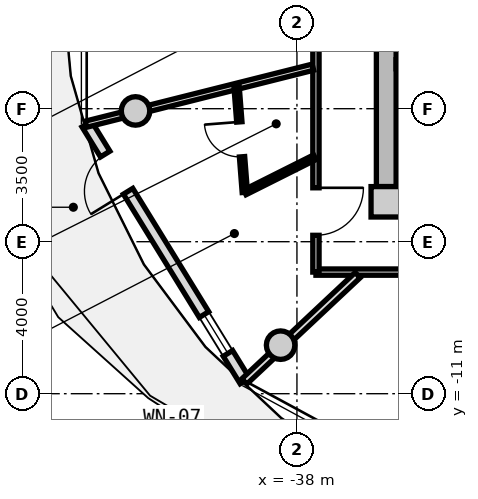
"""IFC4 building model, lengths in metres.
Left out: names, types, materials, properties, quantities, classifications, styles, units other than length and angle.
Written with IfcOpenShell. Run it as: python <this file> out.ifc"""

import sys

from ifc_helpers import new_model, si_unit, direction, frame, frame_2d, origin, origin_2d, place, context, subcontext, project, spatial, rectangle, circle, extrude, source, transform, mapped, element, fill, save


model = new_model("IFC4")
c1 = context("Model", 3, precision=1e-05, world=origin(), true_north=direction((0.0, 1.0)))
c2 = subcontext(c1, "Body", "Model", "MODEL_VIEW")
j1 = project(units=[si_unit("LENGTHUNIT", "METRE"), si_unit("PLANEANGLEUNIT", "RADIAN")], contexts=[c1])
p1 = place(None, origin())
s1 = spatial("IfcSite", under=j1, at=p1, CompositionType="ELEMENT")
p2 = place(p1, origin())
s2 = spatial("IfcBuilding", under=s1, at=p2, CompositionType="ELEMENT")
p3 = place(p2, frame((0.0, 0.0, 220.0)))
s3 = spatial("IfcBuildingStorey", under=s2, at=p3, CompositionType="ELEMENT", Elevation=220.0)
m1 = source(origin(), c2, "Body", "SweptSolid", [
    extrude(rectangle(XDim=0.8, YDim=0.8, at=origin_2d()), origin(), (0.0, 0.0, 1.0), 3.05),
])
p4 = place(p3, frame((-35.65, -5.95, 0.0), z_axis=(0.0, 0.0, 1.0), x_axis=(1.0, 0.0, 0.0)))
e1 = element("IfcColumn", 1, at=p4, inside=s3, PredefinedType="COLUMN", context=c2, shape_type="MappedRepresentation", body=[
    mapped(m1, transform((0.0, 0.0, 0.0), x_axis=(1.0, 0.0, 0.0), y_axis=(0.0, 1.0, 0.0), z_axis=(0.0, 0.0, 1.0), scale=1.0)),
])
m2 = source(origin(), c2, "Body", "SweptSolid", [
    extrude(rectangle(XDim=11.1, YDim=0.52, at=frame_2d((5.55, 0.0))), origin(), (0.0, 0.0, 1.0), 2.76),
])
p5 = place(p3, frame((-35.65, -5.55, 0.0), z_axis=(0.0, 0.0, 1.0), x_axis=(0.0, 1.0, 0.0)))
e2 = element("IfcWall", 2, at=p5, inside=s3, PredefinedType="SHEAR", context=c2, shape_type="MappedRepresentation", body=[
    mapped(m2, transform((0.0, 0.0, 0.0), x_axis=(1.0, 0.0, 0.0), y_axis=(0.0, 1.0, 0.0), z_axis=(0.0, 0.0, 1.0), scale=1.0)),
])
p6 = place(p5, frame((3.8, 0.0, 0.0)))
e3 = element("IfcOpeningElement", 3, at=p6, cuts=e2, PredefinedType="OPENING", context=c2, shape_type="SweptSolid", body=[
    extrude(rectangle(XDim=1.2, YDim=2.15, at=frame_2d((0.6, 1.075))), frame((0.0, 0.27, 0.0), z_axis=(0.0, -1.0, 0.0), x_axis=(1.0, 0.0, 0.0)), (0.0, 0.0, 1.0), 0.54),
])
m3 = source(origin(), c2, "Body", "SweptSolid", [
    extrude(circle(Radius=0.375, at=origin_2d()), origin(), (0.0, 0.0, 1.0), 3.05),
])
for number, where, z_axis, x_axis in (
    (4, (-42.247, -3.559, 0.0), (0.0, 0.0, 1.0), (1.0, 0.0, 0.0)),
    (5, (-38.43, -9.723, 0.0), (0.0, 0.0, 1.0), (1.0, 0.0, 0.0)),
):
    element("IfcColumn", number, at=place(p3, frame(where, z_axis=z_axis, x_axis=x_axis)), inside=s3, PredefinedType="COLUMN", context=c2, shape_type="MappedRepresentation", body=[
        mapped(m3, transform((0.0, 0.0, 0.0), x_axis=(1.0, 0.0, 0.0), y_axis=(0.0, 1.0, 0.0), z_axis=(0.0, 0.0, 1.0), scale=1.0)),
    ])
m4 = source(origin(), c2, "Body", "SweptSolid", [
    extrude(rectangle(XDim=7.938, YDim=0.29, at=frame_2d((3.969, 0.0))), origin(), (0.0, 0.0, 1.0), 2.76),
])
p7 = place(p3, frame((-39.37, -10.663, 0.0), z_axis=(0.0, 0.0, 1.0), x_axis=(-0.524244987663, 0.851567491694, 0.0)))
e6 = element("IfcWall", 6, at=p7, inside=s3, PredefinedType="SOLIDWALL", context=c2, shape_type="MappedRepresentation", body=[
    mapped(m4, transform((0.0, 0.0, 0.0), x_axis=(1.0, 0.0, 0.0), y_axis=(0.0, 1.0, 0.0), z_axis=(0.0, 0.0, 1.0), scale=1.0)),
])
p8 = place(p7, frame((5.86, 0.0, 0.0)))
e7 = element("IfcOpeningElement", 7, at=p8, cuts=e6, PredefinedType="OPENING", context=c2, shape_type="SweptSolid", body=[
    extrude(rectangle(XDim=1.15, YDim=2.25, at=frame_2d((0.575, 1.125))), frame((0.0, 0.155, 0.0), z_axis=(0.0, -1.0, 0.0), x_axis=(1.0, 0.0, 0.0)), (0.0, 0.0, 1.0), 0.31),
])
p9 = place(p7, frame((0.85, 0.0, 0.85)))
e8 = element("IfcOpeningElement", 8, at=p9, cuts=e6, PredefinedType="OPENING", context=c2, shape_type="SweptSolid", body=[
    extrude(rectangle(XDim=1.2, YDim=1.5, at=frame_2d((0.6, 0.75))), frame((0.0, 0.155, 0.0), z_axis=(0.0, -1.0, 0.0), x_axis=(1.0, 0.0, 0.0)), (0.0, 0.0, 1.0), 0.31),
])
m5 = source(origin(), c2, "Body", "SweptSolid", [
    extrude(rectangle(XDim=7.93, YDim=0.24, at=frame_2d((3.965, 0.0))), origin(), (0.0, 0.0, 1.0), 2.76),
])
p10 = place(p3, frame((-35.39, -2.33, 0.0), z_axis=(0.0, 0.0, 1.0), x_axis=(1.0, 0.0, 0.0)))
e9 = element("IfcWall", 9, at=p10, inside=s3, PredefinedType="PARTITIONING", context=c2, shape_type="MappedRepresentation", body=[
    mapped(m5, transform((0.0, 0.0, 0.0), x_axis=(1.0, 0.0, 0.0), y_axis=(0.0, 1.0, 0.0), z_axis=(0.0, 0.0, 1.0), scale=1.0)),
])
p11 = place(p10, frame((1.05, 0.0, 0.0)))
e10 = element("IfcOpeningElement", 10, at=p11, cuts=e9, PredefinedType="OPENING", context=c2, shape_type="SweptSolid", body=[
    extrude(rectangle(XDim=1.1, YDim=2.15, at=frame_2d((0.55, 1.075))), frame((0.0, 0.13, 0.0), z_axis=(0.0, -1.0, 0.0), x_axis=(1.0, 0.0, 0.0)), (0.0, 0.0, 1.0), 0.26),
])
m6 = source(origin(), c2, "Body", "SweptSolid", [
    extrude(rectangle(XDim=19.0, YDim=0.165, at=frame_2d((9.5, 0.0))), origin(), (0.0, 0.0, 1.0), 2.745),
])
p12 = place(p3, frame((-18.5, -7.8, 0.0), z_axis=(0.0, 0.0, 1.0), x_axis=(-1.0, 0.0, 0.0)))
e11 = element("IfcWall", 11, at=p12, inside=s3, PredefinedType="PARTITIONING", context=c2, shape_type="MappedRepresentation", body=[
    mapped(m6, transform((0.0, 0.0, 0.0), x_axis=(1.0, 0.0, 0.0), y_axis=(0.0, 1.0, 0.0), z_axis=(0.0, 0.0, 1.0), scale=1.0)),
])
p13 = place(p12, frame((14.191, 0.0, 0.0)))
e12 = element("IfcOpeningElement", 12, at=p13, cuts=e11, PredefinedType="OPENING", context=c2, shape_type="SweptSolid", body=[
    extrude(rectangle(XDim=1.25, YDim=2.2, at=frame_2d((0.625, 1.1))), frame((0.0, 0.093, 0.0), z_axis=(0.0, -1.0, 0.0), x_axis=(1.0, 0.0, 0.0)), (0.0, 0.0, 1.0), 0.185),
])
p14 = place(p12, frame((8.875, 0.0, 0.0)))
e13 = element("IfcOpeningElement", 13, at=p14, cuts=e11, PredefinedType="OPENING", context=c2, shape_type="SweptSolid", body=[
    extrude(rectangle(XDim=1.25, YDim=2.2, at=frame_2d((0.625, 1.1))), frame((0.0, 0.093, 0.0), z_axis=(0.0, -1.0, 0.0), x_axis=(1.0, 0.0, 0.0)), (0.0, 0.0, 1.0), 0.185),
])
p15 = place(p12, frame((3.559, 0.0, 0.0)))
e14 = element("IfcOpeningElement", 14, at=p15, cuts=e11, PredefinedType="OPENING", context=c2, shape_type="SweptSolid", body=[
    extrude(rectangle(XDim=1.25, YDim=2.2, at=frame_2d((0.625, 1.1))), frame((0.0, 0.093, 0.0), z_axis=(0.0, -1.0, 0.0), x_axis=(1.0, 0.0, 0.0)), (0.0, 0.0, 1.0), 0.185),
])
m7 = source(origin(), c2, "Body", "SweptSolid", [
    extrude(rectangle(XDim=6.88, YDim=0.165, at=frame_2d((3.44, 0.0))), origin(), (0.0, 0.0, 1.0), 2.745),
])
p16 = place(p3, frame((-37.5, -7.8, 0.0), z_axis=(0.0, 0.0, 1.0), x_axis=(0.0, 1.0, 0.0)))
e15 = element("IfcWall", 15, at=p16, inside=s3, PredefinedType="PARTITIONING", context=c2, shape_type="MappedRepresentation", body=[
    mapped(m7, transform((0.0, 0.0, 0.0), x_axis=(1.0, 0.0, 0.0), y_axis=(0.0, 1.0, 0.0), z_axis=(0.0, 0.0, 1.0), scale=1.0)),
])
p17 = place(p16, frame((0.968, 0.0, 0.0)))
e16 = element("IfcOpeningElement", 16, at=p17, cuts=e15, PredefinedType="OPENING", context=c2, shape_type="SweptSolid", body=[
    extrude(rectangle(XDim=1.25, YDim=2.2, at=frame_2d((0.625, 1.1))), frame((0.0, 0.093, 0.0), z_axis=(0.0, -1.0, 0.0), x_axis=(1.0, 0.0, 0.0)), (0.0, 0.0, 1.0), 0.185),
])
m8 = source(origin(), c2, "Body", "SweptSolid", [
    extrude(rectangle(XDim=6.157, YDim=0.165, at=frame_2d((3.079, 0.0))), origin(), (0.0, 0.0, 1.0), 2.345),
])
p18 = place(p3, frame((-37.58, -2.407, 0.0), z_axis=(0.0, 0.0, 1.0), x_axis=(-0.969840867184, -0.243738984038, 0.0)))
e17 = element("IfcWall", 17, at=p18, inside=s3, PredefinedType="PARTITIONING", context=c2, shape_type="MappedRepresentation", body=[
    mapped(m8, transform((0.0, 0.0, 0.0), x_axis=(1.0, 0.0, 0.0), y_axis=(0.0, 1.0, 0.0), z_axis=(0.0, 0.0, 1.0), scale=1.0)),
])
m9 = source(origin(), c2, "Body", "SweptSolid", [
    extrude(rectangle(XDim=4.089, YDim=0.19, at=frame_2d((2.044, 0.0))), origin(), (0.0, 0.0, 1.0), 2.385),
])
p19 = place(p3, frame((-36.402, -7.88, 0.0), z_axis=(0.0, 0.0, 1.0), x_axis=(-0.729401273609, -0.684086092577, 0.0)))
e18 = element("IfcWall", 18, at=p19, inside=s3, PredefinedType="PARTITIONING", context=c2, shape_type="MappedRepresentation", body=[
    mapped(m9, transform((0.0, 0.0, 0.0), x_axis=(1.0, 0.0, 0.0), y_axis=(0.0, 1.0, 0.0), z_axis=(0.0, 0.0, 1.0), scale=1.0)),
])
m10 = source(origin(), c2, "Body", "SweptSolid", [
    extrude(rectangle(XDim=2.06, YDim=0.14, at=frame_2d((1.03, 0.0))), origin(), (0.0, 0.0, 1.0), 2.745),
])
p20 = place(p3, frame((-37.53, -4.778, 0.0), z_axis=(0.0, 0.0, 1.0), x_axis=(-0.893952568722, -0.448161583444, 0.0)))
e19 = element("IfcWall", 19, at=p20, inside=s3, PredefinedType="PARTITIONING", context=c2, shape_type="MappedRepresentation", body=[
    mapped(m10, transform((0.0, 0.0, 0.0), x_axis=(1.0, 0.0, 0.0), y_axis=(0.0, 1.0, 0.0), z_axis=(0.0, 0.0, 1.0), scale=1.0)),
])
m11 = source(origin(), c2, "Body", "SweptSolid", [
    extrude(rectangle(XDim=2.798, YDim=0.14, at=frame_2d((1.399, 0.0))), origin(), (0.0, 0.0, 1.0), 2.745),
])
p21 = place(p3, frame((-39.371, -5.701, 0.0), z_axis=(0.0, 0.0, 1.0), x_axis=(-0.077823984089, 0.996967114553, 0.0)))
e20 = element("IfcWall", 20, at=p21, inside=s3, PredefinedType="PARTITIONING", context=c2, shape_type="MappedRepresentation", body=[
    mapped(m11, transform((0.0, 0.0, 0.0), x_axis=(1.0, 0.0, 0.0), y_axis=(0.0, 1.0, 0.0), z_axis=(0.0, 0.0, 1.0), scale=1.0)),
])
p22 = place(p21, frame((0.939, 0.0, 0.0)))
e21 = element("IfcOpeningElement", 21, at=p22, cuts=e20, PredefinedType="OPENING", context=c2, shape_type="SweptSolid", body=[
    extrude(rectangle(XDim=0.92, YDim=2.1, at=frame_2d((0.46, 1.05))), frame((0.0, 0.08, 0.0), z_axis=(0.0, -1.0, 0.0), x_axis=(1.0, 0.0, 0.0)), (0.0, 0.0, 1.0), 0.16),
])
m12 = source(origin(), c2, "Body", "SweptSolid", [
    extrude(rectangle(XDim=1.15, YDim=2.25, at=frame_2d((0.575, 1.125))), frame((0.0, 0.025, 0.0), z_axis=(0.0, -1.0, 0.0), x_axis=(1.0, 0.0, 0.0)), (0.0, 0.0, 1.0), 0.05),
])
p23 = place(p8, origin())
e22 = element("IfcDoor", 22, at=p23, inside=s3, OperationType="SINGLE_SWING_LEFT", PredefinedType="DOOR", context=c2, shape_type="MappedRepresentation", body=[
    mapped(m12, transform((0.0, 0.0, 0.0), x_axis=(1.0, 0.0, 0.0), y_axis=(0.0, 1.0, 0.0), z_axis=(0.0, 0.0, 1.0), scale=1.0)),
])
fill(e7, e22)
m13 = source(origin(), c2, "Body", "SweptSolid", [
    extrude(rectangle(XDim=1.2, YDim=1.5, at=frame_2d((0.6, 0.75))), frame((0.0, 0.03, 0.0), z_axis=(0.0, -1.0, 0.0), x_axis=(1.0, 0.0, 0.0)), (0.0, 0.0, 1.0), 0.06),
])
p24 = place(p9, origin())
e23 = element("IfcWindow", 23, at=p24, inside=s3, PartitioningType="SINGLE_PANEL", PredefinedType="WINDOW", context=c2, shape_type="MappedRepresentation", body=[
    mapped(m13, transform((0.0, 0.0, 0.0), x_axis=(1.0, 0.0, 0.0), y_axis=(0.0, 1.0, 0.0), z_axis=(0.0, 0.0, 1.0), scale=1.0)),
])
fill(e8, e23)
m14 = source(origin(), c2, "Body", "SweptSolid", [
    extrude(rectangle(XDim=1.25, YDim=2.2, at=frame_2d((0.625, 1.1))), frame((0.0, 0.025, 0.0), z_axis=(0.0, -1.0, 0.0), x_axis=(1.0, 0.0, 0.0)), (0.0, 0.0, 1.0), 0.05),
])
p25 = place(p17, frame((1.25, 0.0, 0.0), z_axis=(0.0, 0.0, 1.0), x_axis=(-1.0, 0.0, 0.0)))
e24 = element("IfcDoor", 24, at=p25, inside=s3, OperationType="SINGLE_SWING_LEFT", PredefinedType="DOOR", context=c2, shape_type="MappedRepresentation", body=[
    mapped(m14, transform((0.0, 0.0, 0.0), x_axis=(1.0, 0.0, 0.0), y_axis=(0.0, 1.0, 0.0), z_axis=(0.0, 0.0, 1.0), scale=1.0)),
])
fill(e16, e24)
m15 = source(origin(), c2, "Body", "SweptSolid", [
    extrude(rectangle(XDim=0.92, YDim=2.1, at=frame_2d((0.46, 1.05))), frame((0.0, 0.025, 0.0), z_axis=(0.0, -1.0, 0.0), x_axis=(1.0, 0.0, 0.0)), (0.0, 0.0, 1.0), 0.05),
])
p26 = place(p22, origin())
e25 = element("IfcDoor", 25, at=p26, inside=s3, OperationType="SINGLE_SWING_RIGHT", PredefinedType="DOOR", context=c2, shape_type="MappedRepresentation", body=[
    mapped(m15, transform((0.0, 0.0, 0.0), x_axis=(1.0, 0.0, 0.0), y_axis=(0.0, 1.0, 0.0), z_axis=(0.0, 0.0, 1.0), scale=1.0)),
])
fill(e21, e25)
save(model, sys.argv[1])
